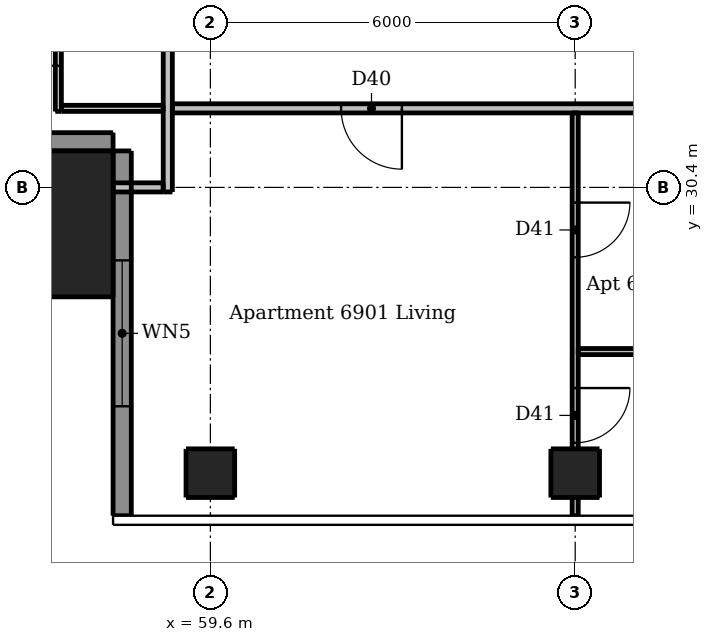
"""IFC4 building model, lengths in metres.
Left out: names, types, materials, properties, quantities, classifications, styles, units other than length and angle.
Written with IfcOpenShell. Run it as: python <this file> out.ifc"""

import sys

from ifc_helpers import new_model, si_unit, direction, frame, frame_2d, origin, origin_2d, place, context, subcontext, project, spatial, rectangle, extrude, element, fill, save


model = new_model("IFC4")
c1 = context("Model", 3, precision=1e-05, world=origin(), true_north=direction((0.0, 1.0)))
c2 = subcontext(c1, "Body", "Model", "MODEL_VIEW")
j1 = project(units=[si_unit("LENGTHUNIT", "METRE"), si_unit("PLANEANGLEUNIT", "RADIAN")], contexts=[c1])
p1 = place(None, origin())
s1 = spatial("IfcSite", under=j1, at=p1, CompositionType="ELEMENT")
p2 = place(p1, origin())
s2 = spatial("IfcBuilding", under=s1, at=p2, CompositionType="ELEMENT")
p3 = place(p2, frame((0.0, 0.0, 258.7)))
s3 = spatial("IfcBuildingStorey", under=s2, at=p3, CompositionType="ELEMENT", Elevation=258.7)
for number, where, z_axis, x_axis in (
    (1, (59.6, 25.7, 0.0), (0.0, 0.0, 1.0), (1.0, 0.0, 0.0)),
    (2, (65.6, 25.7, 0.0), (0.0, 0.0, 1.0), (1.0, 0.0, 0.0)),
):
    element("IfcColumn", number, at=place(p3, frame(where, z_axis=z_axis, x_axis=x_axis)), inside=s3, PredefinedType="COLUMN", context=c2, shape_type="SweptSolid", body=[
        extrude(rectangle(XDim=0.8, YDim=0.8, at=origin_2d()), origin(), (0.0, 0.0, 1.0), 3.05),
    ])
p4 = place(p3, frame((56.8, 29.8, 0.0), z_axis=(0.0, 0.0, 1.0), x_axis=(1.0, 0.0, 0.0)))
e3 = element("IfcColumn", 3, at=p4, inside=s3, PredefinedType="COLUMN", context=c2, shape_type="SweptSolid", body=[
    extrude(rectangle(XDim=2.4, YDim=2.4, at=origin_2d()), origin(), (0.0, 0.0, 1.0), 3.3),
])
p5 = place(p3, frame((53.0, 31.15, 0.0), z_axis=(0.0, 0.0, 1.0), x_axis=(1.0, 0.0, 0.0)))
e4 = element("IfcWall", 4, at=p5, inside=s3, PredefinedType="SOLIDWALL", context=c2, shape_type="SweptSolid", body=[
    extrude(rectangle(XDim=5.0, YDim=0.3, at=frame_2d((2.5, 0.0))), origin(), (0.0, 0.0, 1.0), 3.05),
])
p6 = place(p3, frame((58.15, 31.0, 0.0), z_axis=(0.0, 0.0, 1.0), x_axis=(0.0, -1.0, 0.0)))
e5 = element("IfcWall", 5, at=p6, inside=s3, PredefinedType="SOLIDWALL", context=c2, shape_type="SweptSolid", body=[
    extrude(rectangle(XDim=6.0, YDim=0.3, at=frame_2d((3.0, 0.0))), origin(), (0.0, 0.0, 1.0), 3.05),
])
p7 = place(p6, frame((1.8, 0.0, 0.15)))
e6 = element("IfcOpeningElement", 6, at=p7, cuts=e5, PredefinedType="OPENING", context=c2, shape_type="SweptSolid", body=[
    extrude(rectangle(XDim=2.4, YDim=2.1, at=frame_2d((1.2, 1.05))), frame((0.0, 0.16, 0.0), z_axis=(0.0, -1.0, 0.0), x_axis=(1.0, 0.0, 0.0)), (0.0, 0.0, 1.0), 0.32),
])
p8 = place(p3, frame((57.1, 31.65, 0.0), z_axis=(0.0, 0.0, 1.0), x_axis=(0.0, 1.0, 0.0)))
e7 = element("IfcWall", 7, at=p8, inside=s3, PredefinedType="PARTITIONING", context=c2, shape_type="SweptSolid", body=[
    extrude(rectangle(XDim=16.675, YDim=0.1, at=frame_2d((8.337, 0.0))), origin(), (0.0, 0.0, 1.0), 3.05),
])
p9 = place(p8, frame((6.1, 0.0, 0.0)))
e8 = element("IfcOpeningElement", 8, at=p9, cuts=e7, PredefinedType="OPENING", context=c2, shape_type="SweptSolid", body=[
    extrude(rectangle(XDim=0.9, YDim=2.1, at=frame_2d((0.45, 1.05))), frame((0.0, 0.06, 0.0), z_axis=(0.0, -1.0, 0.0), x_axis=(1.0, 0.0, 0.0)), (0.0, 0.0, 1.0), 0.12),
])
p10 = place(p8, frame((9.1, 0.0, 0.0)))
e9 = element("IfcOpeningElement", 9, at=p10, cuts=e7, PredefinedType="OPENING", context=c2, shape_type="SweptSolid", body=[
    extrude(rectangle(XDim=0.9, YDim=2.1, at=frame_2d((0.45, 1.05))), frame((0.0, 0.06, 0.0), z_axis=(0.0, -1.0, 0.0), x_axis=(1.0, 0.0, 0.0)), (0.0, 0.0, 1.0), 0.12),
])
p11 = place(p8, frame((0.75, 0.0, 0.0)))
e10 = element("IfcOpeningElement", 10, at=p11, cuts=e7, PredefinedType="OPENING", context=c2, shape_type="SweptSolid", body=[
    extrude(rectangle(XDim=0.9, YDim=2.1, at=frame_2d((0.45, 1.05))), frame((0.0, 0.06, 0.0), z_axis=(0.0, -1.0, 0.0), x_axis=(1.0, 0.0, 0.0)), (0.0, 0.0, 1.0), 0.12),
])
p12 = place(p8, frame((14.5, 0.0, 0.0)))
e11 = element("IfcOpeningElement", 11, at=p12, cuts=e7, PredefinedType="OPENING", context=c2, shape_type="SweptSolid", body=[
    extrude(rectangle(XDim=0.9, YDim=2.1, at=frame_2d((0.45, 1.05))), frame((0.0, 0.06, 0.0), z_axis=(0.0, -1.0, 0.0), x_axis=(1.0, 0.0, 0.0)), (0.0, 0.0, 1.0), 0.12),
])
p13 = place(p8, frame((3.15, 0.0, 0.0)))
e12 = element("IfcOpeningElement", 12, at=p13, cuts=e7, PredefinedType="OPENING", context=c2, shape_type="SweptSolid", body=[
    extrude(rectangle(XDim=0.8, YDim=2.1, at=frame_2d((0.4, 1.05))), frame((0.0, 0.06, 0.0), z_axis=(0.0, -1.0, 0.0), x_axis=(1.0, 0.0, 0.0)), (0.0, 0.0, 1.0), 0.12),
])
p14 = place(p8, frame((11.55, 0.0, 0.0)))
e13 = element("IfcOpeningElement", 13, at=p14, cuts=e7, PredefinedType="OPENING", context=c2, shape_type="SweptSolid", body=[
    extrude(rectangle(XDim=0.8, YDim=2.1, at=frame_2d((0.4, 1.05))), frame((0.0, 0.06, 0.0), z_axis=(0.0, -1.0, 0.0), x_axis=(1.0, 0.0, 0.0)), (0.0, 0.0, 1.0), 0.12),
])
p15 = place(p3, frame((65.6, 31.625, 0.0), z_axis=(0.0, 0.0, 1.0), x_axis=(0.0, -1.0, 0.0)))
e14 = element("IfcWall", 14, at=p15, inside=s3, PredefinedType="PARTITIONING", context=c2, shape_type="SweptSolid", body=[
    extrude(rectangle(XDim=6.625, YDim=0.1, at=frame_2d((3.312, 0.0))), origin(), (0.0, 0.0, 1.0), 2.589),
])
p16 = place(p15, frame((1.475, 0.0, 0.0)))
e15 = element("IfcOpeningElement", 15, at=p16, cuts=e14, PredefinedType="OPENING", context=c2, shape_type="SweptSolid", body=[
    extrude(rectangle(XDim=0.9, YDim=2.1, at=frame_2d((0.45, 1.05))), frame((0.0, 0.06, 0.0), z_axis=(0.0, -1.0, 0.0), x_axis=(1.0, 0.0, 0.0)), (0.0, 0.0, 1.0), 0.12),
])
p17 = place(p15, frame((4.525, 0.0, 0.0)))
e16 = element("IfcOpeningElement", 16, at=p17, cuts=e14, PredefinedType="OPENING", context=c2, shape_type="SweptSolid", body=[
    extrude(rectangle(XDim=0.9, YDim=2.1, at=frame_2d((0.45, 1.05))), frame((0.0, 0.06, 0.0), z_axis=(0.0, -1.0, 0.0), x_axis=(1.0, 0.0, 0.0)), (0.0, 0.0, 1.0), 0.12),
])
p18 = place(p3, frame((57.15, 31.7, 0.0), z_axis=(0.0, 0.0, 1.0), x_axis=(1.0, 0.0, 0.0)))
e17 = element("IfcWall", 17, at=p18, inside=s3, PredefinedType="PARTITIONING", context=c2, shape_type="SweptSolid", body=[
    extrude(rectangle(XDim=1.675, YDim=0.1, at=frame_2d((0.837, 0.0))), origin(), (0.0, 0.0, 1.0), 3.05),
])
p19 = place(p3, frame((65.65, 27.7, 0.0), z_axis=(0.0, 0.0, 1.0), x_axis=(1.0, 0.0, 0.0)))
e18 = element("IfcWall", 18, at=p19, inside=s3, PredefinedType="PARTITIONING", context=c2, shape_type="SweptSolid", body=[
    extrude(rectangle(XDim=5.875, YDim=0.1, at=frame_2d((2.938, 0.0))), origin(), (0.0, 0.0, 1.0), 3.05),
])
p20 = place(p19, frame((3.75, 0.0, 0.0)))
e19 = element("IfcOpeningElement", 19, at=p20, cuts=e18, PredefinedType="OPENING", context=c2, shape_type="SweptSolid", body=[
    extrude(rectangle(XDim=0.8, YDim=2.1, at=frame_2d((0.4, 1.05))), frame((0.0, 0.06, 0.0), z_axis=(0.0, -1.0, 0.0), x_axis=(1.0, 0.0, 0.0)), (0.0, 0.0, 1.0), 0.12),
])
p21 = place(p3, frame((58.9, 30.325, 0.0), z_axis=(0.0, 0.0, 1.0), x_axis=(0.0, 1.0, 0.0)))
e20 = element("IfcWall", 20, at=p21, inside=s3, PredefinedType="PARTITIONING", context=c2, shape_type="SweptSolid", body=[
    extrude(rectangle(XDim=30.85, YDim=0.15, at=frame_2d((15.425, 0.0))), origin(), (0.0, 0.0, 1.0), 3.05),
])
p22 = place(p21, frame((9.225, 0.0, 0.0)))
e21 = element("IfcOpeningElement", 21, at=p22, cuts=e20, PredefinedType="OPENING", context=c2, shape_type="SweptSolid", body=[
    extrude(rectangle(XDim=1.0, YDim=2.1, at=frame_2d((0.5, 1.05))), frame((0.0, 0.085, 0.0), z_axis=(0.0, -1.0, 0.0), x_axis=(1.0, 0.0, 0.0)), (0.0, 0.0, 1.0), 0.17),
])
p23 = place(p21, frame((26.925, 0.0, 0.0)))
e22 = element("IfcOpeningElement", 22, at=p23, cuts=e20, PredefinedType="OPENING", context=c2, shape_type="SweptSolid", body=[
    extrude(rectangle(XDim=1.0, YDim=2.1, at=frame_2d((0.5, 1.05))), frame((0.0, 0.085, 0.0), z_axis=(0.0, -1.0, 0.0), x_axis=(1.0, 0.0, 0.0)), (0.0, 0.0, 1.0), 0.17),
])
p24 = place(p3, frame((89.525, 31.7, 0.0), z_axis=(0.0, 0.0, 1.0), x_axis=(-1.0, 0.0, 0.0)))
e23 = element("IfcWall", 23, at=p24, inside=s3, PredefinedType="PARTITIONING", context=c2, shape_type="SweptSolid", body=[
    extrude(rectangle(XDim=30.55, YDim=0.15, at=frame_2d((15.275, 0.0))), origin(), (0.0, 0.0, 1.0), 3.05),
])
p25 = place(p24, frame((26.775, 0.0, 0.0)))
e24 = element("IfcOpeningElement", 24, at=p25, cuts=e23, PredefinedType="OPENING", context=c2, shape_type="SweptSolid", body=[
    extrude(rectangle(XDim=1.0, YDim=2.1, at=frame_2d((0.5, 1.05))), frame((0.0, 0.085, 0.0), z_axis=(0.0, -1.0, 0.0), x_axis=(1.0, 0.0, 0.0)), (0.0, 0.0, 1.0), 0.17),
])
p26 = place(p24, frame((9.625, 0.0, 0.0)))
e25 = element("IfcOpeningElement", 25, at=p26, cuts=e23, PredefinedType="OPENING", context=c2, shape_type="SweptSolid", body=[
    extrude(rectangle(XDim=1.0, YDim=2.1, at=frame_2d((0.5, 1.05))), frame((0.0, 0.085, 0.0), z_axis=(0.0, -1.0, 0.0), x_axis=(1.0, 0.0, 0.0)), (0.0, 0.0, 1.0), 0.17),
])
p27 = place(p24, frame((2.425, 0.0, 0.0)))
e26 = element("IfcOpeningElement", 26, at=p27, cuts=e23, PredefinedType="OPENING", context=c2, shape_type="SweptSolid", body=[
    extrude(rectangle(XDim=1.0, YDim=2.1, at=frame_2d((0.5, 1.05))), frame((0.0, 0.085, 0.0), z_axis=(0.0, -1.0, 0.0), x_axis=(1.0, 0.0, 0.0)), (0.0, 0.0, 1.0), 0.17),
])
p28 = place(p3, frame((58.0, 30.4, 0.0), z_axis=(0.0, 0.0, 1.0), x_axis=(1.0, 0.0, 0.0)))
e27 = element("IfcWall", 27, at=p28, inside=s3, PredefinedType="PARTITIONING", context=c2, shape_type="SweptSolid", body=[
    extrude(rectangle(XDim=0.825, YDim=0.15, at=frame_2d((0.413, 0.0))), origin(), (0.0, 0.0, 1.0), 3.05),
])
p29 = place(p7, origin())
e28 = element("IfcWindow", 28, at=p29, inside=s3, PartitioningType="DOUBLE_PANEL_VERTICAL", PredefinedType="WINDOW", context=c2, shape_type="SweptSolid", body=[
    extrude(rectangle(XDim=2.4, YDim=2.1, at=frame_2d((1.2, 1.05))), frame((0.0, 0.03, 0.0), z_axis=(0.0, -1.0, 0.0), x_axis=(1.0, 0.0, 0.0)), (0.0, 0.0, 1.0), 0.06),
])
fill(e6, e28)
p30 = place(p25, origin())
e29 = element("IfcDoor", 29, at=p30, inside=s3, OperationType="SINGLE_SWING_LEFT", PredefinedType="DOOR", context=c2, shape_type="SweptSolid", body=[
    extrude(rectangle(XDim=1.0, YDim=2.1, at=frame_2d((0.5, 1.05))), frame((0.0, 0.025, 0.0), z_axis=(0.0, -1.0, 0.0), x_axis=(1.0, 0.0, 0.0)), (0.0, 0.0, 1.0), 0.05),
])
fill(e24, e29)
p31 = place(p16, origin())
e30 = element("IfcDoor", 30, at=p31, inside=s3, OperationType="SINGLE_SWING_LEFT", PredefinedType="DOOR", context=c2, shape_type="SweptSolid", body=[
    extrude(rectangle(XDim=0.9, YDim=2.1, at=frame_2d((0.45, 1.05))), frame((0.0, 0.025, 0.0), z_axis=(0.0, -1.0, 0.0), x_axis=(1.0, 0.0, 0.0)), (0.0, 0.0, 1.0), 0.05),
])
fill(e15, e30)
p32 = place(p17, origin())
e31 = element("IfcDoor", 31, at=p32, inside=s3, OperationType="SINGLE_SWING_LEFT", PredefinedType="DOOR", context=c2, shape_type="SweptSolid", body=[
    extrude(rectangle(XDim=0.9, YDim=2.1, at=frame_2d((0.45, 1.05))), frame((0.0, 0.025, 0.0), z_axis=(0.0, -1.0, 0.0), x_axis=(1.0, 0.0, 0.0)), (0.0, 0.0, 1.0), 0.05),
])
fill(e16, e31)
p33 = place(p11, origin())
e32 = element("IfcDoor", 32, at=p33, inside=s3, OperationType="SINGLE_SWING_LEFT", PredefinedType="DOOR", context=c2, shape_type="SweptSolid", body=[
    extrude(rectangle(XDim=0.9, YDim=2.1, at=frame_2d((0.45, 1.05))), frame((0.0, 0.025, 0.0), z_axis=(0.0, -1.0, 0.0), x_axis=(1.0, 0.0, 0.0)), (0.0, 0.0, 1.0), 0.05),
])
fill(e10, e32)
save(model, sys.argv[1])
